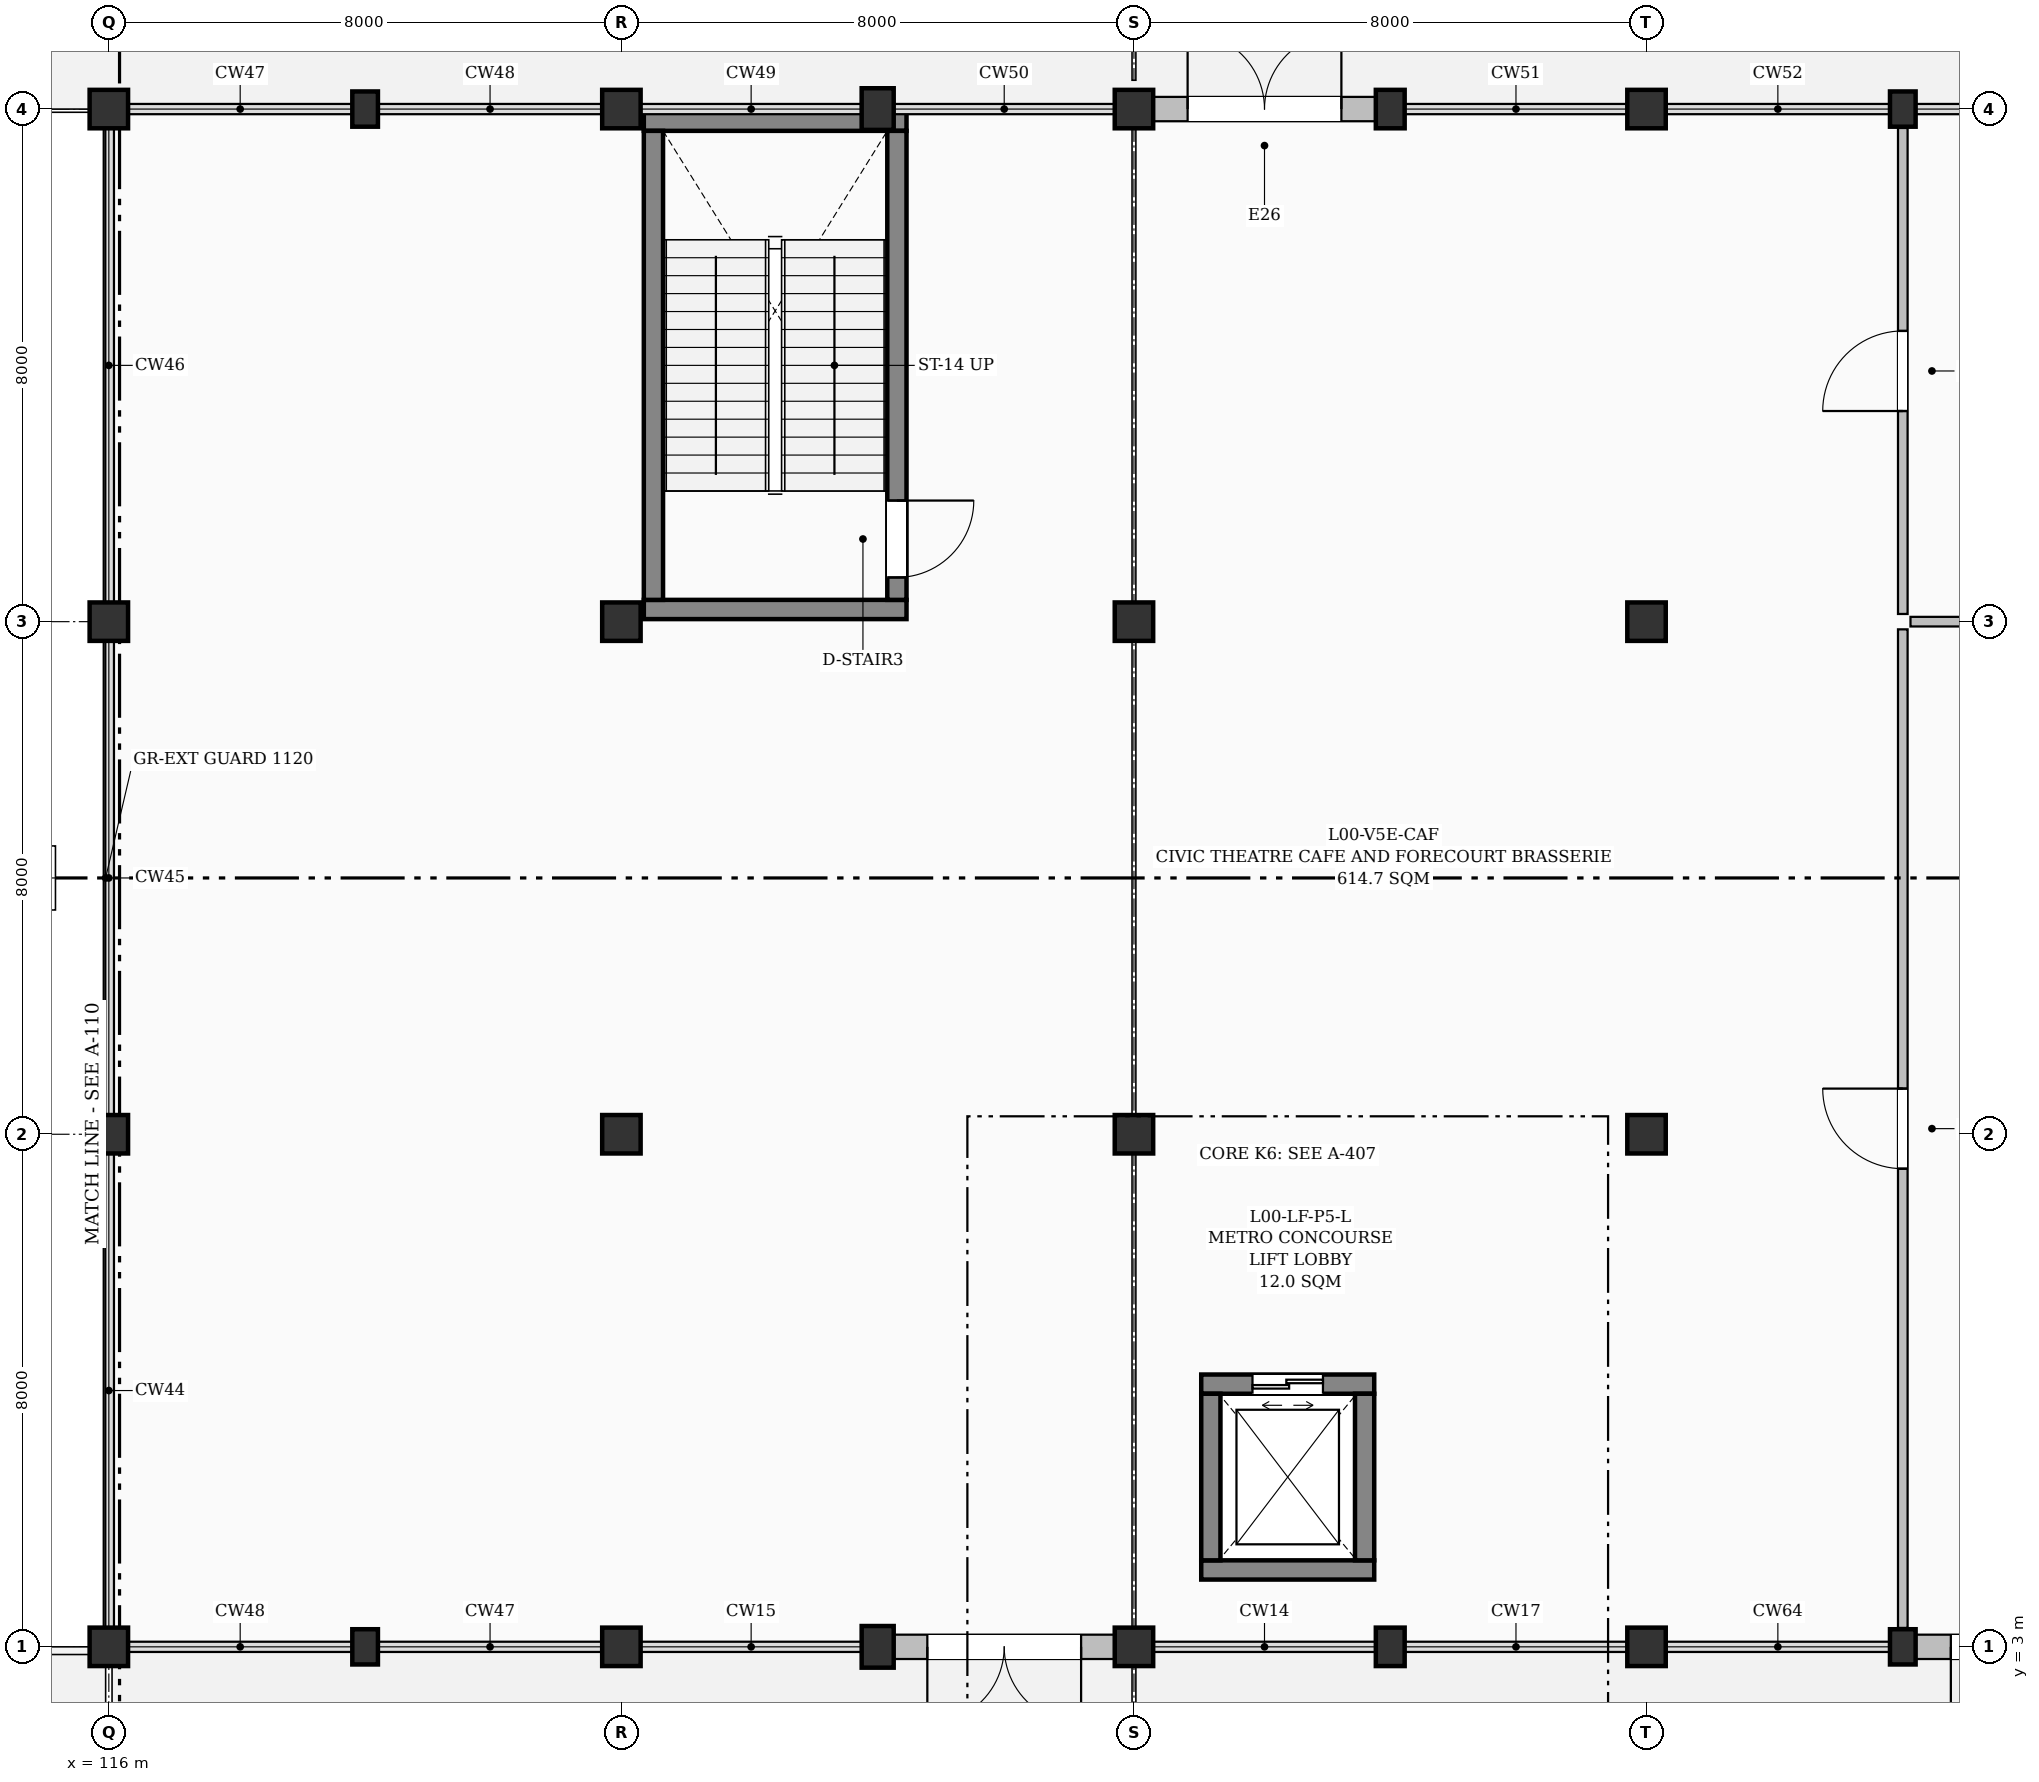
"""IFC4 building model, lengths in metres.
Left out: names, types, materials, properties, quantities, classifications, styles, units other than length and angle.
Written with IfcOpenShell. Run it as: python <this file> out.ifc"""

import sys

from ifc_helpers import new_model, si_unit, direction, frame, frame_2d, origin, origin_2d, place, context, subcontext, project, spatial, rectangle, circle, extrude, element, fill, save


model = new_model("IFC4")
c1 = context("Model", 3, precision=1e-05, world=origin(), true_north=direction((0.0, 1.0)))
c2 = subcontext(c1, "Body", "Model", "MODEL_VIEW")
j1 = project(units=[si_unit("LENGTHUNIT", "METRE"), si_unit("PLANEANGLEUNIT", "RADIAN")], contexts=[c1])
p1 = place(None, origin())
s1 = spatial("IfcSite", under=j1, at=p1, CompositionType="ELEMENT")
p2 = place(p1, origin())
s2 = spatial("IfcBuilding", under=s1, at=p2, CompositionType="ELEMENT")
p3 = place(p2, origin())
s3 = spatial("IfcBuildingStorey", under=s2, at=p3, CompositionType="ELEMENT", Elevation=0.0)
p4 = place(p3, frame((116.0, 3.0, 0.0), z_axis=(0.0, 0.0, 1.0), x_axis=(1.0, 0.0, 0.0)))
e1 = element("IfcColumn", 1, at=p4, inside=s3, PredefinedType="COLUMN", context=c2, shape_type="SweptSolid", body=[
    extrude(circle(Radius=0.3, at=origin_2d()), origin(), (0.0, 0.0, 1.0), 4.8),
])
for number, where, z_axis, x_axis in (
    (2, (116.0, 11.0, 0.0), (0.0, 0.0, 1.0), (1.0, 0.0, 0.0)),
    (3, (116.0, 19.0, 0.0), (0.0, 0.0, 1.0), (1.0, 0.0, 0.0)),
    (4, (116.0, 27.0, 0.0), (0.0, 0.0, 1.0), (1.0, 0.0, 0.0)),
):
    element("IfcColumn", number, at=place(p3, frame(where, z_axis=z_axis, x_axis=x_axis)), inside=s3, PredefinedType="COLUMN", context=c2, shape_type="SweptSolid", body=[
        extrude(rectangle(XDim=0.6, YDim=0.6, at=origin_2d()), origin(), (0.0, 0.0, 1.0), 4.8),
    ])
for number, where, z_axis, x_axis in (
    (5, (120.0, 3.0, 0.0), (0.0, 0.0, 1.0), (1.0, 0.0, 0.0)),
    (6, (120.0, 27.0, 0.0), (0.0, 0.0, 1.0), (1.0, 0.0, 0.0)),
):
    element("IfcColumn", number, at=place(p3, frame(where, z_axis=z_axis, x_axis=x_axis)), inside=s3, PredefinedType="PILASTER", context=c2, shape_type="SweptSolid", body=[
        extrude(rectangle(XDim=0.4, YDim=0.55, at=origin_2d()), origin(), (0.0, 0.0, 1.0), 4.8),
    ])
p5 = place(p3, frame((124.0, 3.0, 0.0), z_axis=(0.0, 0.0, 1.0), x_axis=(1.0, 0.0, 0.0)))
e7 = element("IfcColumn", 7, at=p5, inside=s3, PredefinedType="COLUMN", context=c2, shape_type="SweptSolid", body=[
    extrude(circle(Radius=0.3, at=origin_2d()), origin(), (0.0, 0.0, 1.0), 4.8),
])
for number, where, z_axis, x_axis in (
    (8, (124.0, 11.0, 0.0), (0.0, 0.0, 1.0), (1.0, 0.0, 0.0)),
    (9, (124.0, 19.0, 0.0), (0.0, 0.0, 1.0), (1.0, 0.0, 0.0)),
    (10, (124.0, 27.0, 0.0), (0.0, 0.0, 1.0), (1.0, 0.0, 0.0)),
):
    element("IfcColumn", number, at=place(p3, frame(where, z_axis=z_axis, x_axis=x_axis)), inside=s3, PredefinedType="COLUMN", context=c2, shape_type="SweptSolid", body=[
        extrude(rectangle(XDim=0.6, YDim=0.6, at=origin_2d()), origin(), (0.0, 0.0, 1.0), 4.8),
    ])
for number, where, z_axis, x_axis in (
    (11, (128.0, 3.0, 0.0), (0.0, 0.0, 1.0), (1.0, 0.0, 0.0)),
    (12, (128.0, 27.0, 0.0), (0.0, 0.0, 1.0), (1.0, 0.0, 0.0)),
):
    element("IfcColumn", number, at=place(p3, frame(where, z_axis=z_axis, x_axis=x_axis)), inside=s3, PredefinedType="PILASTER", context=c2, shape_type="SweptSolid", body=[
        extrude(rectangle(XDim=0.5, YDim=0.65, at=origin_2d()), origin(), (0.0, 0.0, 1.0), 4.8),
    ])
p6 = place(p3, frame((132.0, 3.0, 0.0), z_axis=(0.0, 0.0, 1.0), x_axis=(1.0, 0.0, 0.0)))
e13 = element("IfcColumn", 13, at=p6, inside=s3, PredefinedType="COLUMN", context=c2, shape_type="SweptSolid", body=[
    extrude(circle(Radius=0.3, at=origin_2d()), origin(), (0.0, 0.0, 1.0), 4.8),
])
for number, where, z_axis, x_axis in (
    (14, (132.0, 11.0, 0.0), (0.0, 0.0, 1.0), (1.0, 0.0, 0.0)),
    (15, (132.0, 19.0, 0.0), (0.0, 0.0, 1.0), (1.0, 0.0, 0.0)),
    (16, (132.0, 27.0, 0.0), (0.0, 0.0, 1.0), (1.0, 0.0, 0.0)),
):
    element("IfcColumn", number, at=place(p3, frame(where, z_axis=z_axis, x_axis=x_axis)), inside=s3, PredefinedType="COLUMN", context=c2, shape_type="SweptSolid", body=[
        extrude(rectangle(XDim=0.6, YDim=0.6, at=origin_2d()), origin(), (0.0, 0.0, 1.0), 4.8),
    ])
for number, where, z_axis, x_axis in (
    (17, (136.0, 3.0, 0.0), (0.0, 0.0, 1.0), (1.0, 0.0, 0.0)),
    (18, (136.0, 27.0, 0.0), (0.0, 0.0, 1.0), (1.0, 0.0, 0.0)),
):
    element("IfcColumn", number, at=place(p3, frame(where, z_axis=z_axis, x_axis=x_axis)), inside=s3, PredefinedType="PILASTER", context=c2, shape_type="SweptSolid", body=[
        extrude(rectangle(XDim=0.45, YDim=0.6, at=origin_2d()), origin(), (0.0, 0.0, 1.0), 4.8),
    ])
p7 = place(p3, frame((140.0, 3.0, 0.0), z_axis=(0.0, 0.0, 1.0), x_axis=(1.0, 0.0, 0.0)))
e19 = element("IfcColumn", 19, at=p7, inside=s3, PredefinedType="COLUMN", context=c2, shape_type="SweptSolid", body=[
    extrude(circle(Radius=0.3, at=origin_2d()), origin(), (0.0, 0.0, 1.0), 4.8),
])
for number, where, z_axis, x_axis in (
    (20, (140.0, 11.0, 0.0), (0.0, 0.0, 1.0), (1.0, 0.0, 0.0)),
    (21, (140.0, 19.0, 0.0), (0.0, 0.0, 1.0), (1.0, 0.0, 0.0)),
    (22, (140.0, 27.0, 0.0), (0.0, 0.0, 1.0), (1.0, 0.0, 0.0)),
):
    element("IfcColumn", number, at=place(p3, frame(where, z_axis=z_axis, x_axis=x_axis)), inside=s3, PredefinedType="COLUMN", context=c2, shape_type="SweptSolid", body=[
        extrude(rectangle(XDim=0.6, YDim=0.6, at=origin_2d()), origin(), (0.0, 0.0, 1.0), 4.8),
    ])
for number, where, z_axis, x_axis in (
    (23, (144.0, 3.0, 0.0), (0.0, 0.0, 1.0), (1.0, 0.0, 0.0)),
    (24, (144.0, 27.0, 0.0), (0.0, 0.0, 1.0), (1.0, 0.0, 0.0)),
):
    element("IfcColumn", number, at=place(p3, frame(where, z_axis=z_axis, x_axis=x_axis)), inside=s3, PredefinedType="PILASTER", context=c2, shape_type="SweptSolid", body=[
        extrude(rectangle(XDim=0.4, YDim=0.55, at=origin_2d()), origin(), (0.0, 0.0, 1.0), 4.8),
    ])
p8 = place(p3, frame((132.3, 27.0, 0.0), z_axis=(0.0, 0.0, 1.0), x_axis=(1.0, 0.0, 0.0)))
e25 = element("IfcWall", 25, at=p8, inside=s3, PredefinedType="SOLIDWALL", context=c2, shape_type="SweptSolid", body=[
    extrude(rectangle(XDim=3.475, YDim=0.38, at=frame_2d((1.737, 0.0))), origin(), (0.0, 0.0, 1.0), 3.935),
])
p9 = place(p8, frame((0.538, 0.0, 0.0)))
e26 = element("IfcOpeningElement", 26, at=p9, cuts=e25, PredefinedType="OPENING", context=c2, shape_type="SweptSolid", body=[
    extrude(rectangle(XDim=2.4, YDim=2.4, at=frame_2d((1.2, 1.2))), frame((0.0, 0.2, 0.0), z_axis=(0.0, -1.0, 0.0), x_axis=(1.0, 0.0, 0.0)), (0.0, 0.0, 1.0), 0.4),
])
p10 = place(p3, frame((147.7, 3.0, 0.0), z_axis=(0.0, 0.0, 1.0), x_axis=(-1.0, 0.0, 0.0)))
e27 = element("IfcWall", 27, at=p10, inside=s3, PredefinedType="SOLIDWALL", context=c2, shape_type="SweptSolid", body=[
    extrude(rectangle(XDim=3.5, YDim=0.38, at=frame_2d((1.75, 0.0))), origin(), (0.0, 0.0, 1.0), 3.985),
])
p11 = place(p10, frame((0.55, 0.0, 0.0)))
e28 = element("IfcOpeningElement", 28, at=p11, cuts=e27, PredefinedType="OPENING", context=c2, shape_type="SweptSolid", body=[
    extrude(rectangle(XDim=2.4, YDim=2.4, at=frame_2d((1.2, 1.2))), frame((0.0, 0.2, 0.0), z_axis=(0.0, -1.0, 0.0), x_axis=(1.0, 0.0, 0.0)), (0.0, 0.0, 1.0), 0.4),
])
p12 = place(p3, frame((131.7, 3.0, 0.0), z_axis=(0.0, 0.0, 1.0), x_axis=(-1.0, 0.0, 0.0)))
e29 = element("IfcWall", 29, at=p12, inside=s3, PredefinedType="SOLIDWALL", context=c2, shape_type="SweptSolid", body=[
    extrude(rectangle(XDim=3.45, YDim=0.38, at=frame_2d((1.725, 0.0))), origin(), (0.0, 0.0, 1.0), 4.235),
])
p13 = place(p12, frame((0.525, 0.0, 0.0)))
e30 = element("IfcOpeningElement", 30, at=p13, cuts=e29, PredefinedType="OPENING", context=c2, shape_type="SweptSolid", body=[
    extrude(rectangle(XDim=2.4, YDim=2.4, at=frame_2d((1.2, 1.2))), frame((0.0, 0.2, 0.0), z_axis=(0.0, -1.0, 0.0), x_axis=(1.0, 0.0, 0.0)), (0.0, 0.0, 1.0), 0.4),
])
for number, where, z_axis, x_axis in (
    (31, (124.35, 19.19, 0.0), (0.0, 0.0, 1.0), (1.0, 0.0, 0.0)),
    (32, (128.45, 26.81, 0.0), (0.0, 0.0, 1.0), (-1.0, 0.0, 0.0)),
):
    element("IfcWall", number, at=place(p3, frame(where, z_axis=z_axis, x_axis=x_axis)), inside=s3, PredefinedType="SHEAR", context=c2, shape_type="SweptSolid", body=[
        extrude(rectangle(XDim=4.1, YDim=0.3, at=frame_2d((2.05, 0.0))), origin(), (0.0, 0.0, 1.0), 4.55),
    ])
p14 = place(p3, frame((124.5, 19.34, 0.0), z_axis=(0.0, 0.0, 1.0), x_axis=(0.0, 1.0, 0.0)))
e33 = element("IfcWall", 33, at=p14, inside=s3, PredefinedType="SHEAR", context=c2, shape_type="SweptSolid", body=[
    extrude(rectangle(XDim=7.32, YDim=0.3, at=frame_2d((3.66, 0.0))), origin(), (0.0, 0.0, 1.0), 4.55),
])
p15 = place(p3, frame((128.3, 26.66, 0.0), z_axis=(0.0, 0.0, 1.0), x_axis=(0.0, -1.0, 0.0)))
e34 = element("IfcWall", 34, at=p15, inside=s3, PredefinedType="SHEAR", context=c2, shape_type="SweptSolid", body=[
    extrude(rectangle(XDim=7.32, YDim=0.3, at=frame_2d((3.66, 0.0))), origin(), (0.0, 0.0, 1.0), 4.55),
])
p16 = place(p15, frame((5.77, 0.0, 0.0)))
e35 = element("IfcOpeningElement", 35, at=p16, cuts=e34, PredefinedType="OPENING", context=c2, shape_type="SweptSolid", body=[
    extrude(rectangle(XDim=1.2, YDim=2.15, at=frame_2d((0.6, 1.075))), frame((0.0, 0.16, 0.0), z_axis=(0.0, -1.0, 0.0), x_axis=(1.0, 0.0, 0.0)), (0.0, 0.0, 1.0), 0.32),
])
p17 = place(p3, frame((133.05, 4.2, 0.0), z_axis=(0.0, 0.0, 1.0), x_axis=(1.0, 0.0, 0.0)))
e36 = element("IfcWall", 36, at=p17, inside=s3, PredefinedType="SHEAR", context=c2, shape_type="SweptSolid", body=[
    extrude(rectangle(XDim=2.7, YDim=0.3, at=frame_2d((1.35, 0.0))), origin(), (0.0, 0.0, 1.0), 4.55),
])
p18 = place(p3, frame((135.75, 7.1, 0.0), z_axis=(0.0, 0.0, 1.0), x_axis=(-1.0, 0.0, 0.0)))
e37 = element("IfcWall", 37, at=p18, inside=s3, PredefinedType="SHEAR", context=c2, shape_type="SweptSolid", body=[
    extrude(rectangle(XDim=2.7, YDim=0.3, at=frame_2d((1.35, 0.0))), origin(), (0.0, 0.0, 1.0), 4.55),
])
p19 = place(p18, frame((0.8, 0.0, 0.0)))
e38 = element("IfcOpeningElement", 38, at=p19, cuts=e37, PredefinedType="OPENING", context=c2, shape_type="SweptSolid", body=[
    extrude(rectangle(XDim=1.1, YDim=2.15, at=frame_2d((0.55, 1.075))), frame((0.0, 0.16, 0.0), z_axis=(0.0, -1.0, 0.0), x_axis=(1.0, 0.0, 0.0)), (0.0, 0.0, 1.0), 0.32),
])
for number, where, z_axis, x_axis in (
    (39, (133.2, 4.35, 0.0), (0.0, 0.0, 1.0), (0.0, 1.0, 0.0)),
    (40, (135.6, 6.95, 0.0), (0.0, 0.0, 1.0), (0.0, -1.0, 0.0)),
):
    element("IfcWall", number, at=place(p3, frame(where, z_axis=z_axis, x_axis=x_axis)), inside=s3, PredefinedType="SHEAR", context=c2, shape_type="SweptSolid", body=[
        extrude(rectangle(XDim=2.6, YDim=0.3, at=frame_2d((1.3, 0.0))), origin(), (0.0, 0.0, 1.0), 4.55),
    ])
p20 = place(p3, frame((144.0, 3.295, 0.0), z_axis=(0.0, 0.0, 1.0), x_axis=(0.0, 1.0, 0.0)))
e41 = element("IfcWall", 41, at=p20, inside=s3, PredefinedType="PARTITIONING", context=c2, shape_type="SweptSolid", body=[
    extrude(rectangle(XDim=15.585, YDim=0.15, at=frame_2d((7.792, 0.0))), origin(), (0.0, 0.0, 1.0), 4.55),
])
p21 = place(p20, frame((7.167, 0.0, 0.0)))
e42 = element("IfcOpeningElement", 42, at=p21, cuts=e41, PredefinedType="OPENING", context=c2, shape_type="SweptSolid", body=[
    extrude(rectangle(XDim=1.25, YDim=2.15, at=frame_2d((0.625, 1.075))), frame((0.0, 0.085, 0.0), z_axis=(0.0, -1.0, 0.0), x_axis=(1.0, 0.0, 0.0)), (0.0, 0.0, 1.0), 0.17),
])
p22 = place(p3, frame((144.0, 19.12, 0.0), z_axis=(0.0, 0.0, 1.0), x_axis=(0.0, 1.0, 0.0)))
e43 = element("IfcWall", 43, at=p22, inside=s3, PredefinedType="PARTITIONING", context=c2, shape_type="SweptSolid", body=[
    extrude(rectangle(XDim=7.585, YDim=0.15, at=frame_2d((3.792, 0.0))), origin(), (0.0, 0.0, 1.0), 4.55),
])
p23 = place(p22, frame((3.167, 0.0, 0.0)))
e44 = element("IfcOpeningElement", 44, at=p23, cuts=e43, PredefinedType="OPENING", context=c2, shape_type="SweptSolid", body=[
    extrude(rectangle(XDim=1.25, YDim=2.15, at=frame_2d((0.625, 1.075))), frame((0.0, 0.085, 0.0), z_axis=(0.0, -1.0, 0.0), x_axis=(1.0, 0.0, 0.0)), (0.0, 0.0, 1.0), 0.17),
])
p24 = place(p3, frame((144.12, 19.0, 0.0), z_axis=(0.0, 0.0, 1.0), x_axis=(1.0, 0.0, 0.0)))
e45 = element("IfcWall", 45, at=p24, inside=s3, PredefinedType="PARTITIONING", context=c2, shape_type="SweptSolid", body=[
    extrude(rectangle(XDim=17.16, YDim=0.15, at=frame_2d((8.58, 0.0))), origin(), (0.0, 0.0, 1.0), 3.685),
])
p25 = place(p9, origin())
e46 = element("IfcDoor", 46, at=p25, inside=s3, OperationType="DOUBLE_DOOR_SINGLE_SWING", PredefinedType="DOOR", context=c2, shape_type="SweptSolid", body=[
    extrude(rectangle(XDim=2.4, YDim=2.4, at=frame_2d((1.2, 1.2))), frame((0.0, 0.025, 0.0), z_axis=(0.0, -1.0, 0.0), x_axis=(1.0, 0.0, 0.0)), (0.0, 0.0, 1.0), 0.05),
])
fill(e26, e46)
p26 = place(p11, origin())
e47 = element("IfcDoor", 47, at=p26, inside=s3, OperationType="DOUBLE_DOOR_SINGLE_SWING", PredefinedType="DOOR", context=c2, shape_type="SweptSolid", body=[
    extrude(rectangle(XDim=2.4, YDim=2.4, at=frame_2d((1.2, 1.2))), frame((0.0, 0.025, 0.0), z_axis=(0.0, -1.0, 0.0), x_axis=(1.0, 0.0, 0.0)), (0.0, 0.0, 1.0), 0.05),
])
fill(e28, e47)
p27 = place(p13, origin())
e48 = element("IfcDoor", 48, at=p27, inside=s3, OperationType="DOUBLE_DOOR_SINGLE_SWING", PredefinedType="DOOR", context=c2, shape_type="SweptSolid", body=[
    extrude(rectangle(XDim=2.4, YDim=2.4, at=frame_2d((1.2, 1.2))), frame((0.0, 0.025, 0.0), z_axis=(0.0, -1.0, 0.0), x_axis=(1.0, 0.0, 0.0)), (0.0, 0.0, 1.0), 0.05),
])
fill(e30, e48)
p28 = place(p16, origin())
e49 = element("IfcDoor", 49, at=p28, inside=s3, OperationType="SINGLE_SWING_LEFT", PredefinedType="DOOR", context=c2, shape_type="SweptSolid", body=[
    extrude(rectangle(XDim=1.2, YDim=2.15, at=frame_2d((0.6, 1.075))), frame((0.0, 0.025, 0.0), z_axis=(0.0, -1.0, 0.0), x_axis=(1.0, 0.0, 0.0)), (0.0, 0.0, 1.0), 0.05),
])
fill(e35, e49)
p29 = place(p19, origin())
e50 = element("IfcDoor", 50, at=p29, inside=s3, OperationType="DOUBLE_DOOR_SLIDING", PredefinedType="DOOR", context=c2, shape_type="SweptSolid", body=[
    extrude(rectangle(XDim=1.1, YDim=2.15, at=frame_2d((0.55, 1.075))), frame((0.0, 0.025, 0.0), z_axis=(0.0, -1.0, 0.0), x_axis=(1.0, 0.0, 0.0)), (0.0, 0.0, 1.0), 0.05),
])
fill(e38, e50)
p30 = place(p21, origin())
e51 = element("IfcDoor", 51, at=p30, inside=s3, OperationType="SINGLE_SWING_RIGHT", PredefinedType="DOOR", context=c2, shape_type="SweptSolid", body=[
    extrude(rectangle(XDim=1.25, YDim=2.15, at=frame_2d((0.625, 1.075))), frame((0.0, 0.025, 0.0), z_axis=(0.0, -1.0, 0.0), x_axis=(1.0, 0.0, 0.0)), (0.0, 0.0, 1.0), 0.05),
])
fill(e42, e51)
p31 = place(p23, origin())
e52 = element("IfcDoor", 52, at=p31, inside=s3, OperationType="SINGLE_SWING_LEFT", PredefinedType="DOOR", context=c2, shape_type="SweptSolid", body=[
    extrude(rectangle(XDim=1.25, YDim=2.15, at=frame_2d((0.625, 1.075))), frame((0.0, 0.025, 0.0), z_axis=(0.0, -1.0, 0.0), x_axis=(1.0, 0.0, 0.0)), (0.0, 0.0, 1.0), 0.05),
])
fill(e44, e52)
save(model, sys.argv[1])
